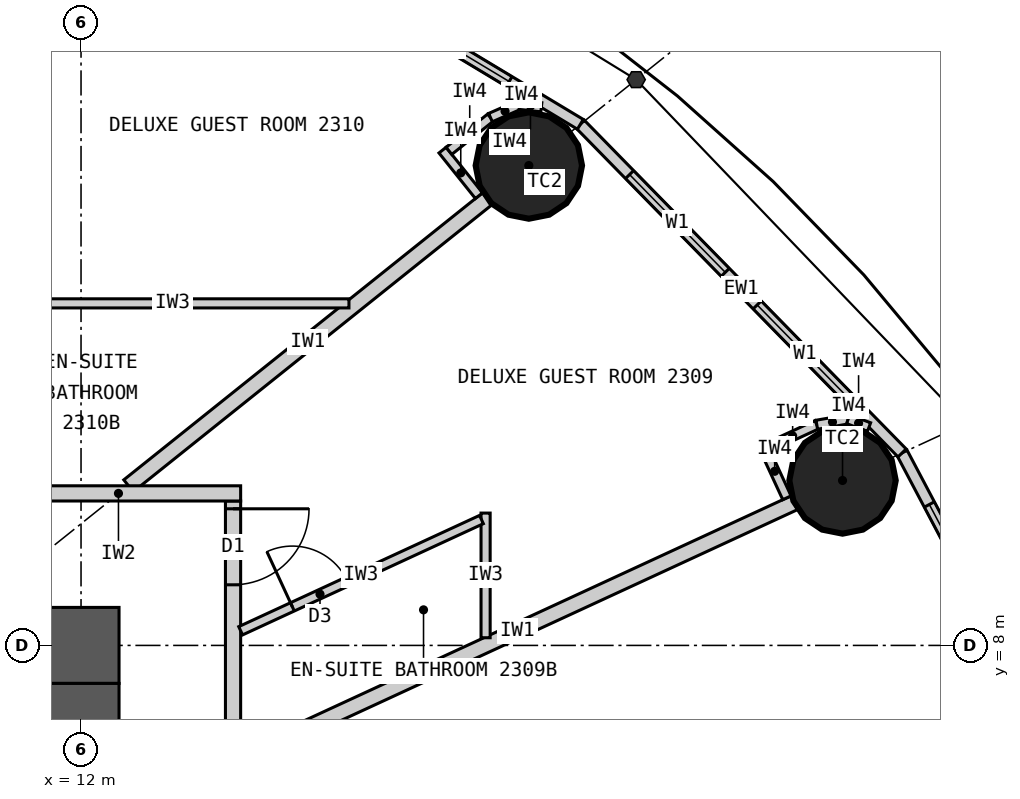
"""IFC4 building model, lengths in metres.
Left out: names, types, materials, properties, quantities, classifications, styles, units other than length and angle.
Written with IfcOpenShell. Run it as: python <this file> out.ifc"""

import sys

from ifc_helpers import new_model, si_unit, direction, frame, frame_2d, origin, origin_2d, place, context, subcontext, project, spatial, rectangle, circle, extrude, clip, halfspace, element, fill, save


model = new_model("IFC4")
c1 = context("Model", 3, precision=1e-05, world=origin(), true_north=direction((0.0, 1.0)))
c2 = subcontext(c1, "Body", "Model", "MODEL_VIEW")
j1 = project(units=[si_unit("LENGTHUNIT", "METRE"), si_unit("PLANEANGLEUNIT", "RADIAN")], contexts=[c1])
p1 = place(None, origin())
s1 = spatial("IfcSite", under=j1, at=p1, CompositionType="ELEMENT")
p2 = place(p1, origin())
s2 = spatial("IfcBuilding", under=s1, at=p2, CompositionType="ELEMENT")
p3 = place(p2, frame((0.0, 0.0, 90.3)))
s3 = spatial("IfcBuildingStorey", under=s2, at=p3, CompositionType="ELEMENT", Elevation=90.3)
for number, where, z_axis, x_axis in (
    (1, (22.019, 10.17, 0.0), (0.0, 0.0, 1.0), (1.0, 0.0, 0.0)),
    (2, (17.892, 14.313, 0.0), (0.0, 0.0, 1.0), (1.0, 0.0, 0.0)),
):
    element("IfcColumn", number, at=place(p3, frame(where, z_axis=z_axis, x_axis=x_axis)), inside=s3, PredefinedType="COLUMN", context=c2, shape_type="Clipping", body=[
        clip(extrude(circle(Radius=0.7, at=origin_2d()), origin(), (0.0, 0.0, 1.0), 3.3), halfspace(frame((0.0, 0.0, 2.25), z_axis=(0.0, 0.0, 1.0), x_axis=(1.0, 0.0, 0.0)), False)),
    ])
p4 = place(p3, frame((-12.5, 8.0, 0.0), z_axis=(0.0, 0.0, 1.0), x_axis=(1.0, 0.0, 0.0)))
e3 = element("IfcWall", 3, at=p4, inside=s3, PredefinedType="SHEAR", context=c2, shape_type="SweptSolid", body=[
    extrude(rectangle(XDim=25.0, YDim=1.0, at=frame_2d((12.5, 0.0))), origin(), (0.0, 0.0, 1.0), 3.3),
])
p5 = place(p4, frame((11.2, 0.0, 0.0)))
e4 = element("IfcOpeningElement", 4, at=p5, cuts=e3, PredefinedType="OPENING", context=c2, shape_type="SweptSolid", body=[
    extrude(rectangle(XDim=1.2, YDim=2.2, at=frame_2d((0.6, 1.1))), frame((0.0, 0.51, 0.0), z_axis=(0.0, -1.0, 0.0), x_axis=(1.0, 0.0, 0.0)), (0.0, 0.0, 1.0), 1.02),
])
p6 = place(p4, frame((18.8, 0.0, 0.0)))
e5 = element("IfcOpeningElement", 5, at=p6, cuts=e3, PredefinedType="OPENING", context=c2, shape_type="SweptSolid", body=[
    extrude(rectangle(XDim=0.9, YDim=2.2, at=frame_2d((0.45, 1.1))), frame((0.0, 0.51, 0.0), z_axis=(0.0, -1.0, 0.0), x_axis=(1.0, 0.0, 0.0)), (0.0, 0.0, 1.0), 1.02),
])
p7 = place(p3, frame((12.0, -7.5, 0.0), z_axis=(0.0, 0.0, 1.0), x_axis=(0.0, 1.0, 0.0)))
e6 = element("IfcWall", 6, at=p7, inside=s3, PredefinedType="SHEAR", context=c2, shape_type="SweptSolid", body=[
    extrude(rectangle(XDim=15.0, YDim=1.0, at=frame_2d((7.5, 0.0))), origin(), (0.0, 0.0, 1.0), 3.3),
])
p8 = place(p7, frame((6.6, 0.0, 0.0)))
e7 = element("IfcOpeningElement", 7, at=p8, cuts=e6, PredefinedType="OPENING", context=c2, shape_type="SweptSolid", body=[
    extrude(rectangle(XDim=1.8, YDim=2.2, at=frame_2d((0.9, 1.1))), frame((0.0, 0.51, 0.0), z_axis=(0.0, -1.0, 0.0), x_axis=(1.0, 0.0, 0.0)), (0.0, 0.0, 1.0), 1.02),
])
p9 = place(p3, frame((25.482, 5.462, 0.0), z_axis=(0.0, 0.0, 1.0), x_axis=(-0.467296867008, 0.884100468321, 0.0)))
e8 = element("IfcWall", 8, at=p9, inside=s3, PredefinedType="ELEMENTEDWALL", context=c2, shape_type="SweptSolid", body=[
    extrude(rectangle(XDim=5.734, YDim=0.15, at=frame_2d((2.867, 0.0))), origin(), (0.0, 0.0, 1.0), 3.05),
])
p10 = place(p9, frame((0.767, 0.0, 0.9)))
e9 = element("IfcOpeningElement", 9, at=p10, cuts=e8, PredefinedType="OPENING", context=c2, shape_type="SweptSolid", body=[
    extrude(rectangle(XDim=1.8, YDim=1.9, at=frame_2d((0.9, 0.95))), frame((0.0, 0.085, 0.0), z_axis=(0.0, -1.0, 0.0), x_axis=(1.0, 0.0, 0.0)), (0.0, 0.0, 1.0), 0.17),
])
p11 = place(p9, frame((3.167, 0.0, 0.9)))
e10 = element("IfcOpeningElement", 10, at=p11, cuts=e8, PredefinedType="OPENING", context=c2, shape_type="SweptSolid", body=[
    extrude(rectangle(XDim=1.8, YDim=1.9, at=frame_2d((0.9, 0.95))), frame((0.0, 0.085, 0.0), z_axis=(0.0, -1.0, 0.0), x_axis=(1.0, 0.0, 0.0)), (0.0, 0.0, 1.0), 0.17),
])
p12 = place(p3, frame((22.803, 10.532, 0.0), z_axis=(0.0, 0.0, 1.0), x_axis=(-0.699602905915, 0.714531856557, 0.0)))
e11 = element("IfcWall", 11, at=p12, inside=s3, PredefinedType="ELEMENTEDWALL", context=c2, shape_type="SweptSolid", body=[
    extrude(rectangle(XDim=6.051, YDim=0.15, at=frame_2d((3.025, 0.0))), origin(), (0.0, 0.0, 1.0), 3.05),
])
p13 = place(p12, frame((0.926, 0.0, 0.9)))
e12 = element("IfcOpeningElement", 12, at=p13, cuts=e11, PredefinedType="OPENING", context=c2, shape_type="SweptSolid", body=[
    extrude(rectangle(XDim=1.8, YDim=1.9, at=frame_2d((0.9, 0.95))), frame((0.0, 0.085, 0.0), z_axis=(0.0, -1.0, 0.0), x_axis=(1.0, 0.0, 0.0)), (0.0, 0.0, 1.0), 0.17),
])
p14 = place(p12, frame((3.325, 0.0, 0.9)))
e13 = element("IfcOpeningElement", 13, at=p14, cuts=e11, PredefinedType="OPENING", context=c2, shape_type="SweptSolid", body=[
    extrude(rectangle(XDim=1.8, YDim=1.9, at=frame_2d((0.9, 0.95))), frame((0.0, 0.085, 0.0), z_axis=(0.0, -1.0, 0.0), x_axis=(1.0, 0.0, 0.0)), (0.0, 0.0, 1.0), 0.17),
])
p15 = place(p3, frame((18.57, 14.856, 0.0), z_axis=(0.0, 0.0, 1.0), x_axis=(-0.856983180864, 0.515344377787, 0.0)))
e14 = element("IfcWall", 14, at=p15, inside=s3, PredefinedType="ELEMENTEDWALL", context=c2, shape_type="SweptSolid", body=[
    extrude(rectangle(XDim=6.386, YDim=0.15, at=frame_2d((3.193, 0.0))), origin(), (0.0, 0.0, 1.0), 3.05),
])
p16 = place(p15, frame((1.093, 0.0, 0.9)))
e15 = element("IfcOpeningElement", 15, at=p16, cuts=e14, PredefinedType="OPENING", context=c2, shape_type="SweptSolid", body=[
    extrude(rectangle(XDim=1.8, YDim=1.9, at=frame_2d((0.9, 0.95))), frame((0.0, 0.085, 0.0), z_axis=(0.0, -1.0, 0.0), x_axis=(1.0, 0.0, 0.0)), (0.0, 0.0, 1.0), 0.17),
])
p17 = place(p15, frame((3.493, 0.0, 0.9)))
e16 = element("IfcOpeningElement", 16, at=p17, cuts=e14, PredefinedType="OPENING", context=c2, shape_type="SweptSolid", body=[
    extrude(rectangle(XDim=1.8, YDim=1.9, at=frame_2d((0.9, 0.95))), frame((0.0, 0.085, 0.0), z_axis=(0.0, -1.0, 0.0), x_axis=(1.0, 0.0, 0.0)), (0.0, 0.0, 1.0), 0.17),
])
p18 = place(p3, frame((14.0, -9.9, 0.0), z_axis=(0.0, 0.0, 1.0), x_axis=(0.0, 1.0, 0.0)))
e17 = element("IfcWall", 17, at=p18, inside=s3, PredefinedType="PARTITIONING", context=c2, shape_type="SweptSolid", body=[
    extrude(rectangle(XDim=19.8, YDim=0.2, at=frame_2d((9.9, 0.0))), origin(), (0.0, 0.0, 1.0), 3.05),
])
p19 = place(p18, frame((0.204, 0.0, 0.0)))
e18 = element("IfcOpeningElement", 18, at=p19, cuts=e17, PredefinedType="OPENING", context=c2, shape_type="SweptSolid", body=[
    extrude(rectangle(XDim=1.0, YDim=2.2, at=frame_2d((0.5, 1.1))), frame((0.0, 0.11, 0.0), z_axis=(0.0, -1.0, 0.0), x_axis=(1.0, 0.0, 0.0)), (0.0, 0.0, 1.0), 0.22),
])
p20 = place(p18, frame((13.715, 0.0, 0.0)))
e19 = element("IfcOpeningElement", 19, at=p20, cuts=e17, PredefinedType="OPENING", context=c2, shape_type="SweptSolid", body=[
    extrude(rectangle(XDim=1.0, YDim=2.2, at=frame_2d((0.5, 1.1))), frame((0.0, 0.11, 0.0), z_axis=(0.0, -1.0, 0.0), x_axis=(1.0, 0.0, 0.0)), (0.0, 0.0, 1.0), 0.22),
])
p21 = place(p18, frame((18.698, 0.0, 0.0)))
e20 = element("IfcOpeningElement", 20, at=p21, cuts=e17, PredefinedType="OPENING", context=c2, shape_type="SweptSolid", body=[
    extrude(rectangle(XDim=1.0, YDim=2.2, at=frame_2d((0.5, 1.1))), frame((0.0, 0.11, 0.0), z_axis=(0.0, -1.0, 0.0), x_axis=(1.0, 0.0, 0.0)), (0.0, 0.0, 1.0), 0.22),
])
p22 = place(p3, frame((14.1, 6.512, 0.0), z_axis=(0.0, 0.0, 1.0), x_axis=(0.907832871056, 0.419332181247, 0.0)))
e21 = element("IfcWall", 21, at=p22, inside=s3, PredefinedType="PARTITIONING", context=c2, shape_type="SweptSolid", body=[
    extrude(rectangle(XDim=8.023, YDim=0.2, at=frame_2d((4.011, 0.0))), origin(), (0.0, 0.0, 1.0), 2.15),
])
p23 = place(p3, frame((12.625, 10.1, 0.0), z_axis=(0.0, 0.0, 1.0), x_axis=(0.780892451574, 0.624665493744, 0.0)))
e22 = element("IfcWall", 22, at=p23, inside=s3, PredefinedType="PARTITIONING", context=c2, shape_type="SweptSolid", body=[
    extrude(rectangle(XDim=6.045, YDim=0.2, at=frame_2d((3.022, 0.0))), origin(), (0.0, 0.0, 1.0), 2.25),
])
p24 = place(p3, frame((7.289, 10.1, 0.0), z_axis=(0.0, 0.0, 1.0), x_axis=(0.585198353053, 0.810890182197, 0.0)))
e23 = element("IfcWall", 23, at=p24, inside=s3, PredefinedType="PARTITIONING", context=c2, shape_type="SweptSolid", body=[
    extrude(rectangle(XDim=8.36, YDim=0.2, at=frame_2d((4.18, 0.0))), origin(), (0.0, 0.0, 1.0), 2.15),
])
p25 = place(p3, frame((17.323, 8.101, 0.0), z_axis=(0.0, 0.0, 1.0), x_axis=(0.0, 1.0, 0.0)))
e24 = element("IfcWall", 24, at=p25, inside=s3, PredefinedType="PARTITIONING", context=c2, shape_type="SweptSolid", body=[
    extrude(rectangle(XDim=1.64, YDim=0.12, at=frame_2d((0.82, 0.0))), origin(), (0.0, 0.0, 1.0), 3.05),
])
p26 = place(p3, frame((14.1, 8.193, 0.0), z_axis=(0.0, 0.0, 1.0), x_axis=(0.907836493557, 0.419324338628, 0.0)))
e25 = element("IfcWall", 25, at=p26, inside=s3, PredefinedType="PARTITIONING", context=c2, shape_type="SweptSolid", body=[
    extrude(rectangle(XDim=3.49, YDim=0.12, at=frame_2d((1.745, 0.0))), origin(), (0.0, 0.0, 1.0), 3.05),
])
p27 = place(p26, frame((0.75, 0.0, 0.0)))
e26 = element("IfcOpeningElement", 26, at=p27, cuts=e25, PredefinedType="OPENING", context=c2, shape_type="SweptSolid", body=[
    extrude(rectangle(XDim=0.8, YDim=2.1, at=frame_2d((0.4, 1.05))), frame((0.0, 0.07, 0.0), z_axis=(0.0, -1.0, 0.0), x_axis=(1.0, 0.0, 0.0)), (0.0, 0.0, 1.0), 0.14),
])
p28 = place(p3, frame((15.525, 12.5, 0.0), z_axis=(0.0, 0.0, 1.0), x_axis=(-1.0, 0.0, 0.0)))
e27 = element("IfcWall", 27, at=p28, inside=s3, PredefinedType="PARTITIONING", context=c2, shape_type="SweptSolid", body=[
    extrude(rectangle(XDim=4.64, YDim=0.12, at=frame_2d((2.32, 0.0))), origin(), (0.0, 0.0, 1.0), 3.05),
])
p29 = place(p3, frame((10.885, 10.0, 0.0), z_axis=(0.0, 0.0, 1.0), x_axis=(1.0, 0.0, 0.0)))
e28 = element("IfcWall", 28, at=p29, inside=s3, PredefinedType="PARTITIONING", context=c2, shape_type="SweptSolid", body=[
    extrude(rectangle(XDim=3.215, YDim=0.2, at=frame_2d((1.607, 0.0))), origin(), (0.0, 0.0, 1.0), 3.05),
])
p30 = place(p3, frame((21.287, 9.942, 0.0), z_axis=(0.0, 0.0, 1.0), x_axis=(-0.419259891039, 0.907866258744, 0.0)))
e29 = element("IfcWall", 29, at=p30, inside=s3, PredefinedType="PARTITIONING", context=c2, shape_type="SweptSolid", body=[
    extrude(rectangle(XDim=0.768, YDim=0.12, at=frame_2d((0.384, 0.0))), origin(), (0.0, 0.0, 1.0), 3.05),
])
p31 = place(p3, frame((21.045, 10.61, 0.0), z_axis=(0.0, 0.0, 1.0), x_axis=(0.907877701396, 0.419235112208, 0.0)))
e30 = element("IfcWall", 30, at=p31, inside=s3, PredefinedType="PARTITIONING", context=c2, shape_type="SweptSolid", body=[
    extrude(rectangle(XDim=0.7, YDim=0.12, at=frame_2d((0.35, 0.0))), origin(), (0.0, 0.0, 1.0), 3.05),
])
p32 = place(p3, frame((21.68, 10.903, 0.0), z_axis=(0.0, 0.0, 1.0), x_axis=(0.985446622073, 0.169985161247, 0.0)))
e31 = element("IfcWall", 31, at=p32, inside=s3, PredefinedType="PARTITIONING", context=c2, shape_type="SweptSolid", body=[
    extrude(rectangle(XDim=0.418, YDim=0.12, at=frame_2d((0.209, 0.0))), origin(), (0.0, 0.0, 1.0), 3.05),
])
p33 = place(p3, frame((22.092, 10.974, 0.0), z_axis=(0.0, 0.0, 1.0), x_axis=(0.938428160676, -0.345474437912, 0.0)))
e32 = element("IfcWall", 32, at=p33, inside=s3, PredefinedType="PARTITIONING", context=c2, shape_type="SweptSolid", body=[
    extrude(rectangle(XDim=0.294, YDim=0.12, at=frame_2d((0.147, 0.0))), origin(), (0.0, 0.0, 1.0), 3.05),
])
p34 = place(p3, frame((17.236, 13.917, 0.0), z_axis=(0.0, 0.0, 1.0), x_axis=(-0.624695047554, 0.780868809443, 0.0)))
e33 = element("IfcWall", 33, at=p34, inside=s3, PredefinedType="PARTITIONING", context=c2, shape_type="SweptSolid", body=[
    extrude(rectangle(XDim=0.768, YDim=0.12, at=frame_2d((0.384, 0.0))), origin(), (0.0, 0.0, 1.0), 3.05),
])
p35 = place(p3, frame((16.841, 14.507, 0.0), z_axis=(0.0, 0.0, 1.0), x_axis=(0.780902834923, 0.62465251333, 0.0)))
e34 = element("IfcWall", 34, at=p35, inside=s3, PredefinedType="PARTITIONING", context=c2, shape_type="SweptSolid", body=[
    extrude(rectangle(XDim=0.7, YDim=0.12, at=frame_2d((0.35, 0.0))), origin(), (0.0, 0.0, 1.0), 3.05),
])
p36 = place(p3, frame((17.387, 14.944, 0.0), z_axis=(0.0, 0.0, 1.0), x_axis=(0.916036698064, 0.401094462441, 0.0)))
e35 = element("IfcWall", 35, at=p36, inside=s3, PredefinedType="PARTITIONING", context=c2, shape_type="SweptSolid", body=[
    extrude(rectangle(XDim=0.418, YDim=0.12, at=frame_2d((0.209, 0.0))), origin(), (0.0, 0.0, 1.0), 3.05),
])
p37 = place(p3, frame((17.77, 15.112, 0.0), z_axis=(0.0, 0.0, 1.0), x_axis=(0.993904401174, -0.110245368731, 0.0)))
e36 = element("IfcWall", 36, at=p37, inside=s3, PredefinedType="PARTITIONING", context=c2, shape_type="SweptSolid", body=[
    extrude(rectangle(XDim=0.288, YDim=0.12, at=frame_2d((0.144, 0.0))), origin(), (0.0, 0.0, 1.0), 3.05),
])
p38 = place(p11, origin())
e37 = element("IfcWindow", 37, at=p38, inside=s3, PartitioningType="SINGLE_PANEL", PredefinedType="WINDOW", context=c2, shape_type="SweptSolid", body=[
    extrude(rectangle(XDim=1.8, YDim=1.9, at=frame_2d((0.9, 0.95))), frame((0.0, 0.03, 0.0), z_axis=(0.0, -1.0, 0.0), x_axis=(1.0, 0.0, 0.0)), (0.0, 0.0, 1.0), 0.06),
])
fill(e10, e37)
p39 = place(p13, origin())
e38 = element("IfcWindow", 38, at=p39, inside=s3, PartitioningType="SINGLE_PANEL", PredefinedType="WINDOW", context=c2, shape_type="SweptSolid", body=[
    extrude(rectangle(XDim=1.8, YDim=1.9, at=frame_2d((0.9, 0.95))), frame((0.0, 0.03, 0.0), z_axis=(0.0, -1.0, 0.0), x_axis=(1.0, 0.0, 0.0)), (0.0, 0.0, 1.0), 0.06),
])
fill(e12, e38)
p40 = place(p14, origin())
e39 = element("IfcWindow", 39, at=p40, inside=s3, PartitioningType="SINGLE_PANEL", PredefinedType="WINDOW", context=c2, shape_type="SweptSolid", body=[
    extrude(rectangle(XDim=1.8, YDim=1.9, at=frame_2d((0.9, 0.95))), frame((0.0, 0.03, 0.0), z_axis=(0.0, -1.0, 0.0), x_axis=(1.0, 0.0, 0.0)), (0.0, 0.0, 1.0), 0.06),
])
fill(e13, e39)
p41 = place(p16, origin())
e40 = element("IfcWindow", 40, at=p41, inside=s3, PartitioningType="SINGLE_PANEL", PredefinedType="WINDOW", context=c2, shape_type="SweptSolid", body=[
    extrude(rectangle(XDim=1.8, YDim=1.9, at=frame_2d((0.9, 0.95))), frame((0.0, 0.03, 0.0), z_axis=(0.0, -1.0, 0.0), x_axis=(1.0, 0.0, 0.0)), (0.0, 0.0, 1.0), 0.06),
])
fill(e15, e40)
p42 = place(p27, origin())
e41 = element("IfcDoor", 41, at=p42, inside=s3, OperationType="SINGLE_SWING_LEFT", PredefinedType="DOOR", context=c2, shape_type="SweptSolid", body=[
    extrude(rectangle(XDim=0.8, YDim=2.1, at=frame_2d((0.4, 1.05))), frame((0.0, 0.025, 0.0), z_axis=(0.0, -1.0, 0.0), x_axis=(1.0, 0.0, 0.0)), (0.0, 0.0, 1.0), 0.05),
])
fill(e26, e41)
p43 = place(p21, origin())
e42 = element("IfcDoor", 42, at=p43, inside=s3, OperationType="SINGLE_SWING_RIGHT", PredefinedType="DOOR", context=c2, shape_type="SweptSolid", body=[
    extrude(rectangle(XDim=1.0, YDim=2.2, at=frame_2d((0.5, 1.1))), frame((0.0, 0.025, 0.0), z_axis=(0.0, -1.0, 0.0), x_axis=(1.0, 0.0, 0.0)), (0.0, 0.0, 1.0), 0.05),
])
fill(e20, e42)
save(model, sys.argv[1])
